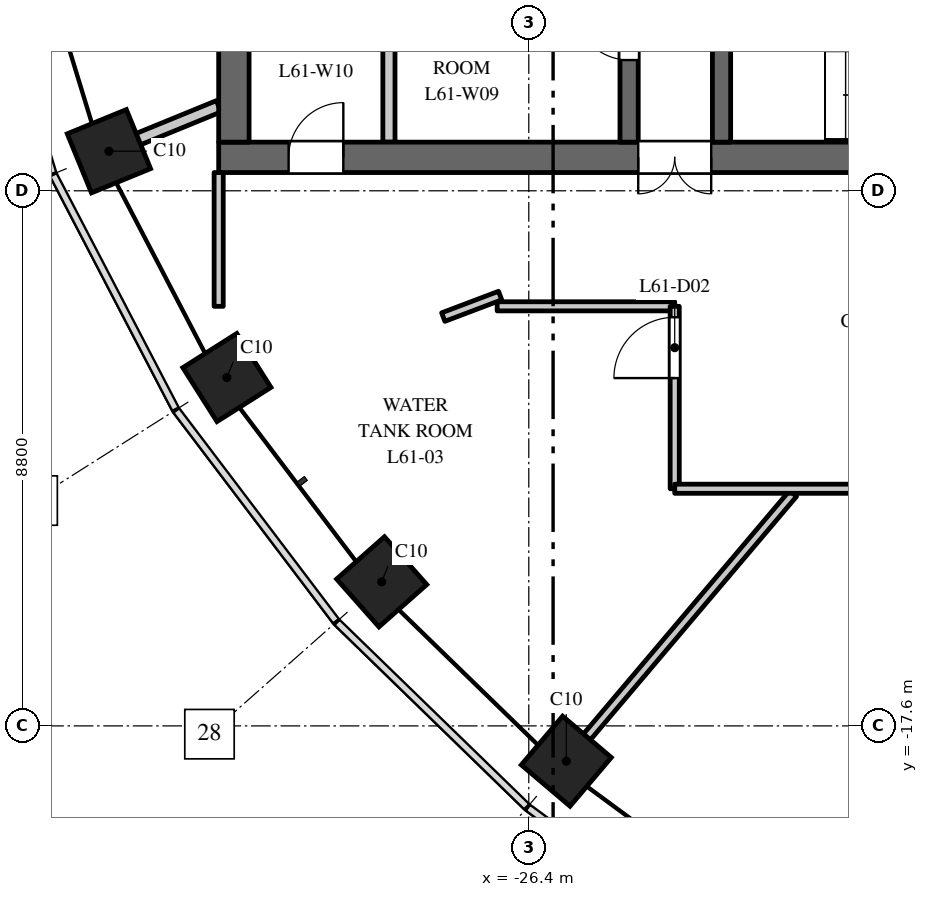
"""IFC4 building model, lengths in metres.
Left out: names, types, materials, properties, quantities, classifications, styles, units other than length and angle.
Written with IfcOpenShell. Run it as: python <this file> out.ifc"""

import sys

from ifc_helpers import new_model, si_unit, direction, frame, frame_2d, origin, origin_2d, place, context, subcontext, project, spatial, rectangle, extrude, element, fill, save


model = new_model("IFC4")
c1 = context("Model", 3, precision=1e-05, world=origin(), true_north=direction((0.0, 1.0)))
c2 = subcontext(c1, "Body", "Model", "MODEL_VIEW")
j1 = project(units=[si_unit("LENGTHUNIT", "METRE"), si_unit("PLANEANGLEUNIT", "RADIAN")], contexts=[c1])
p1 = place(None, origin())
s1 = spatial("IfcSite", under=j1, at=p1, CompositionType="ELEMENT")
p2 = place(p1, origin())
s2 = spatial("IfcBuilding", under=s1, at=p2, CompositionType="ELEMENT")
p3 = place(p2, frame((0.0, 0.0, 285.5)))
s3 = spatial("IfcBuildingStorey", under=s2, at=p3, CompositionType="ELEMENT", Elevation=285.5)
for number, where, z_axis, x_axis in (
    (1, (-33.305, -8.149, 0.0), (0.0, 0.0, 1.0), (0.379, -0.925, 0.0)),
    (2, (-31.365, -11.871, 0.0), (0.0, 0.0, 1.0), (0.535, -0.845, 0.0)),
    (3, (-28.819, -15.23, 0.0), (0.0, 0.0, 1.0), (0.663, -0.749, 0.0)),
    (4, (-25.783, -18.18, 0.0), (0.0, 0.0, 1.0), (0.763, -0.646, 0.0)),
):
    element("IfcColumn", number, at=place(p3, frame(where, z_axis=z_axis, x_axis=x_axis)), inside=s3, PredefinedType="COLUMN", context=c2, shape_type="SweptSolid", body=[
        extrude(rectangle(XDim=1.05, YDim=1.05, at=origin_2d()), origin(), (0.0, 0.0, 1.0), 5.5),
    ])
p4 = place(p3, frame((-16.5, -8.25, 0.0), z_axis=(0.0, 0.0, 1.0), x_axis=(-1.0, 0.0, 0.0)))
e5 = element("IfcWall", 5, at=p4, inside=s3, PredefinedType="SHEAR", context=c2, shape_type="SweptSolid", body=[
    extrude(rectangle(XDim=15.0, YDim=0.5, at=frame_2d((7.5, 0.0))), origin(), (0.0, 0.0, 1.0), 5.2),
])
p5 = place(p4, frame((6.9, 0.0, 0.0)))
e6 = element("IfcOpeningElement", 6, at=p5, cuts=e5, PredefinedType="OPENING", context=c2, shape_type="SweptSolid", body=[
    extrude(rectangle(XDim=1.2, YDim=2.1, at=frame_2d((0.6, 1.05))), frame((0.0, 0.26, 0.0), z_axis=(0.0, -1.0, 0.0), x_axis=(1.0, 0.0, 0.0)), (0.0, 0.0, 1.0), 0.52),
])
p6 = place(p4, frame((12.95, 0.0, 0.0)))
e7 = element("IfcOpeningElement", 7, at=p6, cuts=e5, PredefinedType="OPENING", context=c2, shape_type="SweptSolid", body=[
    extrude(rectangle(XDim=0.9, YDim=2.1, at=frame_2d((0.45, 1.05))), frame((0.0, 0.26, 0.0), z_axis=(0.0, -1.0, 0.0), x_axis=(1.0, 0.0, 0.0)), (0.0, 0.0, 1.0), 0.52),
])
p7 = place(p3, frame((-24.75, -8.0, 0.0), z_axis=(0.0, 0.0, 1.0), x_axis=(0.0, 1.0, 0.0)))
e8 = element("IfcWall", 8, at=p7, inside=s3, PredefinedType="SHEAR", context=c2, shape_type="SweptSolid", body=[
    extrude(rectangle(XDim=16.0, YDim=0.3, at=frame_2d((8.0, 0.0))), origin(), (0.0, 0.0, 1.0), 5.2),
])
p8 = place(p7, frame((4.525, 0.0, 0.0)))
e9 = element("IfcOpeningElement", 9, at=p8, cuts=e8, PredefinedType="OPENING", context=c2, shape_type="SweptSolid", body=[
    extrude(rectangle(XDim=0.9, YDim=2.1, at=frame_2d((0.45, 1.05))), frame((0.0, 0.16, 0.0), z_axis=(0.0, -1.0, 0.0), x_axis=(1.0, 0.0, 0.0)), (0.0, 0.0, 1.0), 0.32),
])
p9 = place(p7, frame((7.55, 0.0, 0.0)))
e10 = element("IfcOpeningElement", 10, at=p9, cuts=e8, PredefinedType="OPENING", context=c2, shape_type="SweptSolid", body=[
    extrude(rectangle(XDim=0.9, YDim=2.1, at=frame_2d((0.45, 1.05))), frame((0.0, 0.16, 0.0), z_axis=(0.0, -1.0, 0.0), x_axis=(1.0, 0.0, 0.0)), (0.0, 0.0, 1.0), 0.32),
])
p10 = place(p7, frame((10.575, 0.0, 0.0)))
e11 = element("IfcOpeningElement", 11, at=p10, cuts=e8, PredefinedType="OPENING", context=c2, shape_type="SweptSolid", body=[
    extrude(rectangle(XDim=0.9, YDim=2.1, at=frame_2d((0.45, 1.05))), frame((0.0, 0.16, 0.0), z_axis=(0.0, -1.0, 0.0), x_axis=(1.0, 0.0, 0.0)), (0.0, 0.0, 1.0), 0.32),
])
p11 = place(p7, frame((13.75, 0.0, 0.0)))
e12 = element("IfcOpeningElement", 12, at=p11, cuts=e8, PredefinedType="OPENING", context=c2, shape_type="SweptSolid", body=[
    extrude(rectangle(XDim=0.9, YDim=2.1, at=frame_2d((0.45, 1.05))), frame((0.0, 0.16, 0.0), z_axis=(0.0, -1.0, 0.0), x_axis=(1.0, 0.0, 0.0)), (0.0, 0.0, 1.0), 0.32),
])
p12 = place(p7, frame((1.35, 0.0, 0.0)))
e13 = element("IfcOpeningElement", 13, at=p12, cuts=e8, PredefinedType="OPENING", context=c2, shape_type="SweptSolid", body=[
    extrude(rectangle(XDim=0.9, YDim=2.1, at=frame_2d((0.45, 1.05))), frame((0.0, 0.16, 0.0), z_axis=(0.0, -1.0, 0.0), x_axis=(1.0, 0.0, 0.0)), (0.0, 0.0, 1.0), 0.32),
])
p13 = place(p3, frame((-31.25, -8.0, 0.0), z_axis=(0.0, 0.0, 1.0), x_axis=(0.0, 1.0, 0.0)))
e14 = element("IfcWall", 14, at=p13, inside=s3, PredefinedType="SHEAR", context=c2, shape_type="SweptSolid", body=[
    extrude(rectangle(XDim=16.0, YDim=0.5, at=frame_2d((8.0, 0.0))), origin(), (0.0, 0.0, 1.0), 5.2),
])
p14 = place(p3, frame((-28.7, -8.0, 0.0), z_axis=(0.0, 0.0, 1.0), x_axis=(0.0, 1.0, 0.0)))
e15 = element("IfcWall", 15, at=p14, inside=s3, PredefinedType="PARTITIONING", context=c2, shape_type="SweptSolid", body=[
    extrude(rectangle(XDim=3.25, YDim=0.2, at=frame_2d((1.625, 0.0))), origin(), (0.0, 0.0, 1.0), 5.2),
])
p15 = place(p3, frame((-23.23, -8.0, 0.0), z_axis=(0.0, 0.0, 1.0), x_axis=(0.0, 1.0, 0.0)))
e16 = element("IfcWall", 16, at=p15, inside=s3, PredefinedType="SHEAR", context=c2, shape_type="SweptSolid", body=[
    extrude(rectangle(XDim=7.875, YDim=0.3, at=frame_2d((3.938, 0.0))), origin(), (0.0, 0.0, 1.0), 5.2),
])
p16 = place(p15, frame((5.15, 0.0, 0.0)))
e17 = element("IfcOpeningElement", 17, at=p16, cuts=e16, PredefinedType="OPENING", context=c2, shape_type="SweptSolid", body=[
    extrude(rectangle(XDim=1.1, YDim=2.1, at=frame_2d((0.55, 1.05))), frame((0.0, 0.16, 0.0), z_axis=(0.0, -1.0, 0.0), x_axis=(1.0, 0.0, 0.0)), (0.0, 0.0, 1.0), 0.32),
])
p17 = place(p3, frame((-33.398, -8.187, 0.0), z_axis=(0.0, 0.0, 1.0), x_axis=(0.925433139688, 0.378910944639, 0.0)))
e18 = element("IfcWall", 18, at=p17, inside=s3, PredefinedType="PARTITIONING", context=c2, shape_type="SweptSolid", body=[
    extrude(rectangle(XDim=2.051, YDim=0.2, at=frame_2d((1.025, 0.0))), origin(), (0.0, 0.0, 1.0), 5.2),
])
p18 = place(p3, frame((-31.5, -10.7, 0.0), z_axis=(0.0, 0.0, 1.0), x_axis=(0.0, 1.0, 0.0)))
e19 = element("IfcWall", 19, at=p18, inside=s3, PredefinedType="PARTITIONING", context=c2, shape_type="SweptSolid", body=[
    extrude(rectangle(XDim=2.2, YDim=0.15, at=frame_2d((1.1, 0.0))), origin(), (0.0, 0.0, 1.0), 5.2),
])
p19 = place(p3, frame((-26.92, -10.7, 0.0), z_axis=(0.0, 0.0, 1.0), x_axis=(1.0, 0.0, 0.0)))
e20 = element("IfcWall", 20, at=p19, inside=s3, PredefinedType="PARTITIONING", context=c2, shape_type="SweptSolid", body=[
    extrude(rectangle(XDim=2.92, YDim=0.15, at=frame_2d((1.46, 0.0))), origin(), (0.0, 0.0, 1.0), 4.4),
])
p20 = place(p3, frame((-25.847, -18.257, 0.0), z_axis=(0.0, 0.0, 1.0), x_axis=(0.646341150503, 0.763048568026, 0.0)))
e21 = element("IfcWall", 21, at=p20, inside=s3, PredefinedType="PARTITIONING", context=c2, shape_type="SweptSolid", body=[
    extrude(rectangle(XDim=5.87, YDim=0.15, at=frame_2d((2.935, 0.0))), origin(), (0.0, 0.0, 1.0), 4.25),
])
p21 = place(p3, frame((-24.0, -13.7, 0.0), z_axis=(0.0, 0.0, 1.0), x_axis=(0.0, 1.0, 0.0)))
e22 = element("IfcWall", 22, at=p21, inside=s3, PredefinedType="PARTITIONING", context=c2, shape_type="SweptSolid", body=[
    extrude(rectangle(XDim=3.0, YDim=0.15, at=frame_2d((1.5, 0.0))), origin(), (0.0, 0.0, 1.0), 5.2),
])
p22 = place(p21, frame((1.82, 0.0, 0.0)))
e23 = element("IfcOpeningElement", 23, at=p22, cuts=e22, PredefinedType="OPENING", context=c2, shape_type="SweptSolid", body=[
    extrude(rectangle(XDim=1.0, YDim=2.1, at=frame_2d((0.5, 1.05))), frame((0.0, 0.085, 0.0), z_axis=(0.0, -1.0, 0.0), x_axis=(1.0, 0.0, 0.0)), (0.0, 0.0, 1.0), 0.17),
])
p23 = place(p3, frame((-24.0, -13.7, 0.0), z_axis=(0.0, 0.0, 1.0), x_axis=(1.0, 0.0, 0.0)))
e24 = element("IfcWall", 24, at=p23, inside=s3, PredefinedType="PARTITIONING", context=c2, shape_type="SweptSolid", body=[
    extrude(rectangle(XDim=13.141, YDim=0.15, at=frame_2d((6.571, 0.0))), origin(), (0.0, 0.0, 1.0), 4.25),
])
p24 = place(p23, frame((11.407, 0.0, 0.0)))
e25 = element("IfcOpeningElement", 25, at=p24, cuts=e24, PredefinedType="OPENING", context=c2, shape_type="SweptSolid", body=[
    extrude(rectangle(XDim=1.2, YDim=2.1, at=frame_2d((0.6, 1.05))), frame((0.0, 0.085, 0.0), z_axis=(0.0, -1.0, 0.0), x_axis=(1.0, 0.0, 0.0)), (0.0, 0.0, 1.0), 0.17),
])
p25 = place(p3, frame((-27.806, -10.877, 0.0), z_axis=(0.0, 0.0, 1.0), x_axis=(0.935251310729, 0.35398444285, 0.0)))
e26 = element("IfcWall", 26, at=p25, inside=s3, PredefinedType="PARTITIONING", context=c2, shape_type="SweptSolid", body=[
    extrude(rectangle(XDim=1.0, YDim=0.15, at=frame_2d((0.5, 0.0))), origin(), (0.0, 0.0, 1.0), 5.2),
])
p26 = place(p5, origin())
e27 = element("IfcDoor", 27, at=p26, inside=s3, OperationType="DOUBLE_DOOR_DOUBLE_SWING", PredefinedType="DOOR", context=c2, shape_type="SweptSolid", body=[
    extrude(rectangle(XDim=1.2, YDim=2.1, at=frame_2d((0.6, 1.05))), frame((0.0, 0.025, 0.0), z_axis=(0.0, -1.0, 0.0), x_axis=(1.0, 0.0, 0.0)), (0.0, 0.0, 1.0), 0.05),
])
fill(e6, e27)
p27 = place(p12, origin())
e28 = element("IfcDoor", 28, at=p27, inside=s3, OperationType="SINGLE_SWING_LEFT", PredefinedType="DOOR", context=c2, shape_type="SweptSolid", body=[
    extrude(rectangle(XDim=0.9, YDim=2.1, at=frame_2d((0.45, 1.05))), frame((0.0, 0.025, 0.0), z_axis=(0.0, -1.0, 0.0), x_axis=(1.0, 0.0, 0.0)), (0.0, 0.0, 1.0), 0.05),
])
fill(e13, e28)
p28 = place(p6, origin())
e29 = element("IfcDoor", 29, at=p28, inside=s3, OperationType="SINGLE_SWING_LEFT", PredefinedType="DOOR", context=c2, shape_type="SweptSolid", body=[
    extrude(rectangle(XDim=0.9, YDim=2.1, at=frame_2d((0.45, 1.05))), frame((0.0, 0.025, 0.0), z_axis=(0.0, -1.0, 0.0), x_axis=(1.0, 0.0, 0.0)), (0.0, 0.0, 1.0), 0.05),
])
fill(e7, e29)
p29 = place(p22, origin())
e30 = element("IfcDoor", 30, at=p29, inside=s3, OperationType="SINGLE_SWING_LEFT", PredefinedType="DOOR", context=c2, shape_type="SweptSolid", body=[
    extrude(rectangle(XDim=1.0, YDim=2.1, at=frame_2d((0.5, 1.05))), frame((0.0, 0.025, 0.0), z_axis=(0.0, -1.0, 0.0), x_axis=(1.0, 0.0, 0.0)), (0.0, 0.0, 1.0), 0.05),
])
fill(e23, e30)
save(model, sys.argv[1])
